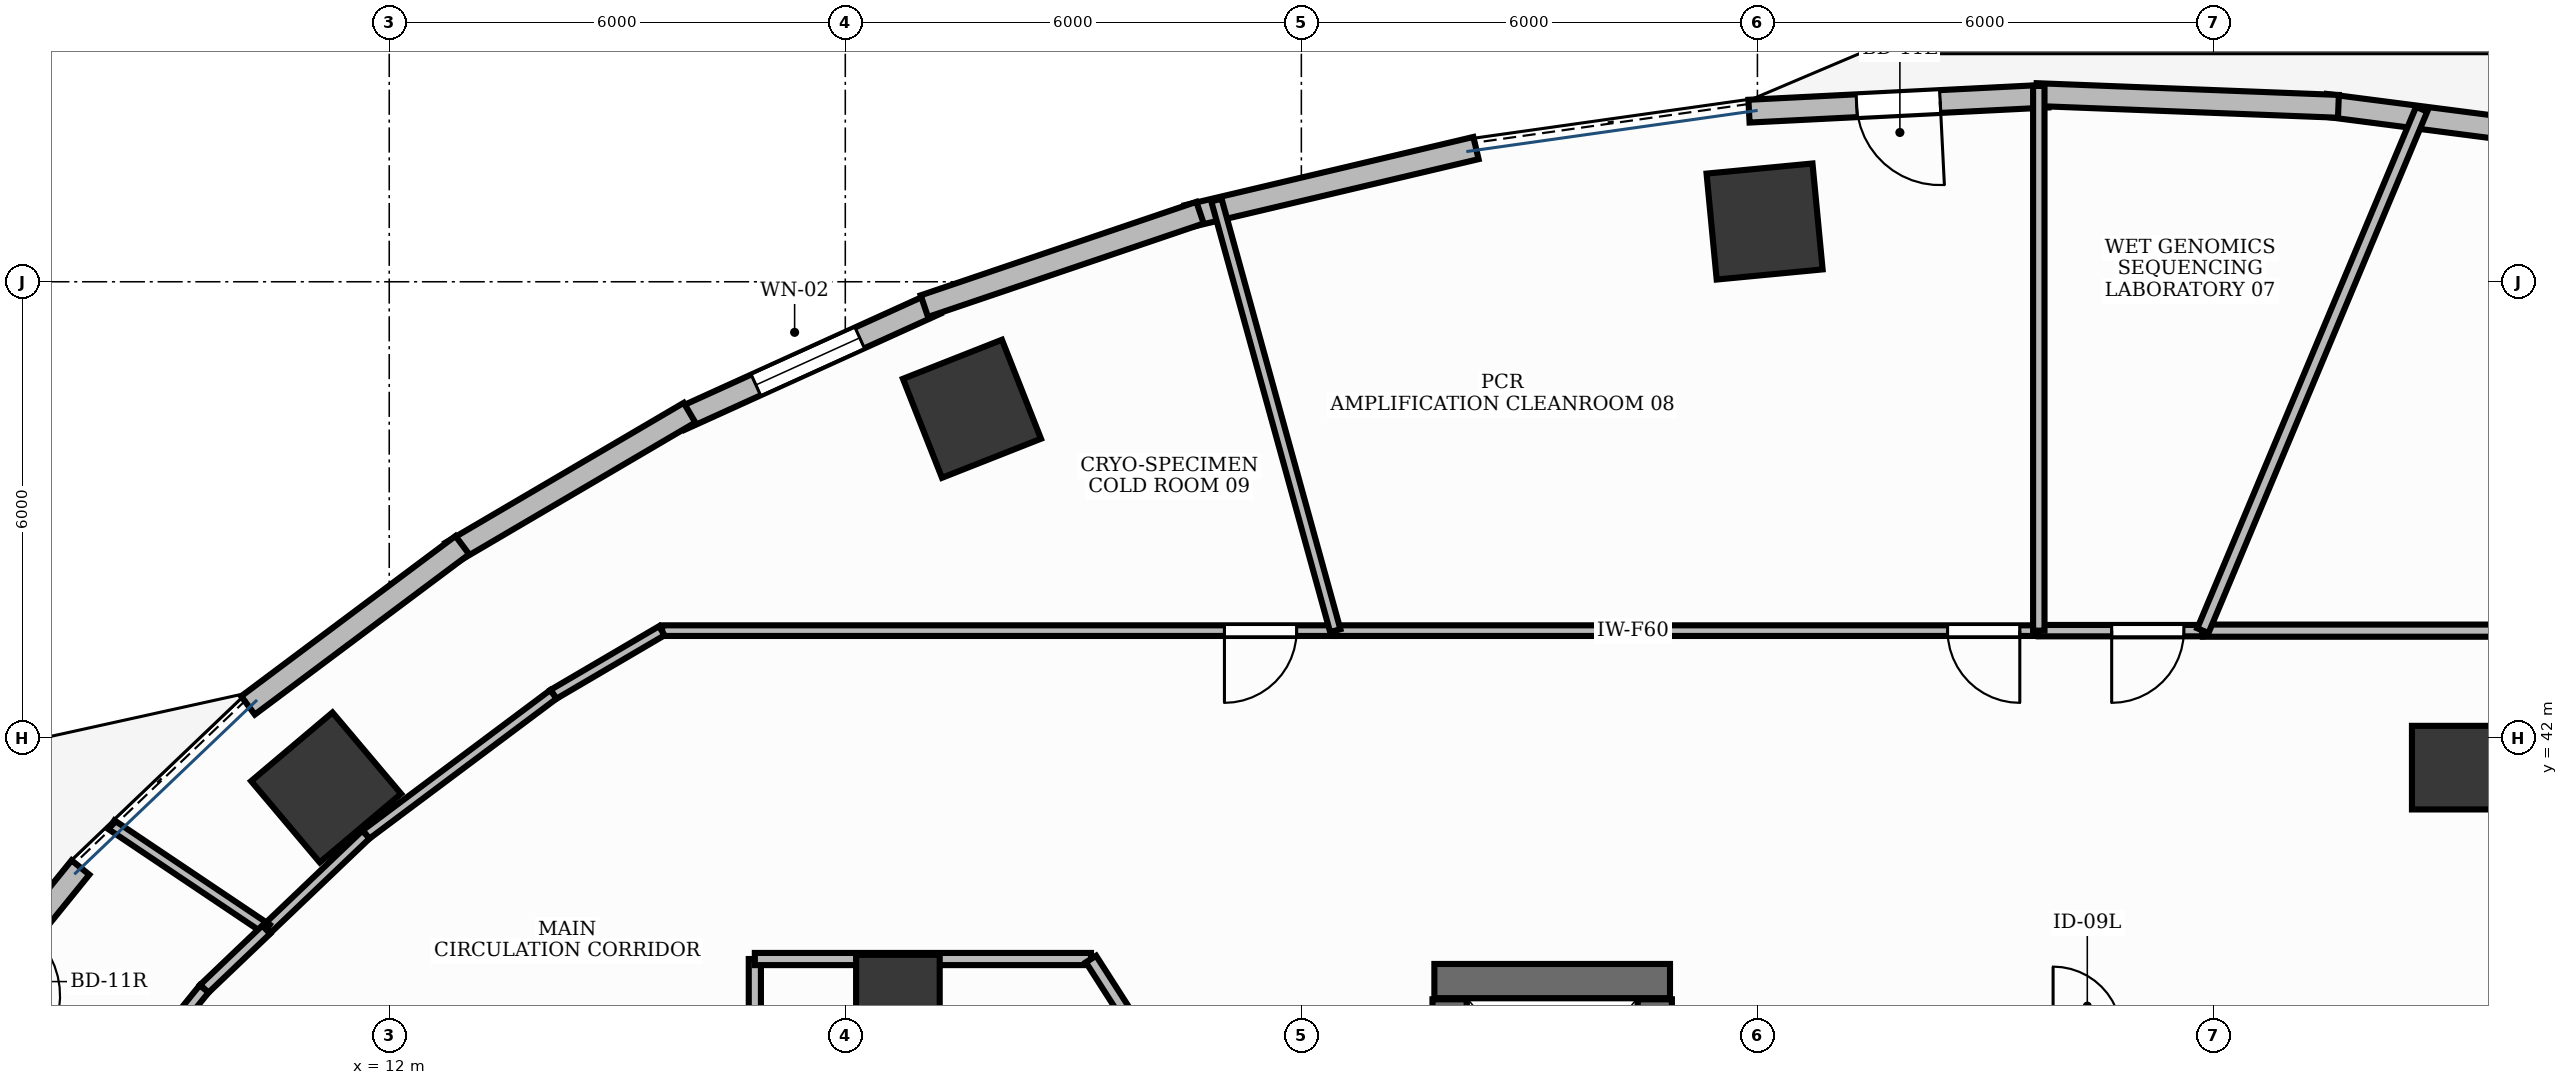
"""IFC4 building model, lengths in metres.
Left out: names, types, materials, properties, quantities, classifications, styles, units other than length and angle.
Written with IfcOpenShell. Run it as: python <this file> out.ifc"""

import sys

from ifc_helpers import new_model, si_unit, direction, frame, frame_2d, origin, origin_2d, place, context, subcontext, project, spatial, rectangle, extrude, element, fill, save


model = new_model("IFC4")
c1 = context("Model", 3, precision=1e-05, world=origin(), true_north=direction((0.0, 1.0)))
c2 = subcontext(c1, "Body", "Model", "MODEL_VIEW")
j1 = project(units=[si_unit("LENGTHUNIT", "METRE"), si_unit("PLANEANGLEUNIT", "RADIAN")], contexts=[c1])
p1 = place(None, origin())
s1 = spatial("IfcSite", under=j1, at=p1, CompositionType="ELEMENT")
p2 = place(p1, origin())
s2 = spatial("IfcBuilding", under=s1, at=p2, CompositionType="ELEMENT")
p3 = place(p2, frame((0.0, 0.0, 80.4)))
s3 = spatial("IfcBuildingStorey", under=s2, at=p3, CompositionType="ELEMENT", Elevation=80.4)
p4 = place(p3, frame((25.75, 38.8, 0.0), z_axis=(0.0, 0.0, 1.0), x_axis=(1.0, 0.0, 0.0)))
e1 = element("IfcWall", 1, at=p4, inside=s3, PredefinedType="SHEAR", context=c2, shape_type="SweptSolid", body=[
    extrude(rectangle(XDim=3.1, YDim=0.45, at=frame_2d((1.55, 0.0))), origin(), (0.0, 0.0, 1.0), 3.88),
])
for number, where, z_axis, x_axis in (
    (2, (25.95, 35.86, 0.0), (0.0, 0.0, 1.0), (0.0, 1.0, 0.0)),
    (3, (28.65, 35.86, 0.0), (0.0, 0.0, 1.0), (0.0, 1.0, 0.0)),
):
    element("IfcWall", number, at=place(p3, frame(where, z_axis=z_axis, x_axis=x_axis)), inside=s3, PredefinedType="SHEAR", context=c2, shape_type="SweptSolid", body=[
        extrude(rectangle(XDim=2.7, YDim=0.45, at=frame_2d((1.35, 0.0))), origin(), (0.0, 0.0, 1.0), 3.88),
    ])
p5 = place(p3, frame((39.161, 41.608, -0.0), z_axis=(0.0, 0.0, 1.0), x_axis=(1.0, 0.0, 0.0)))
e4 = element("IfcColumn", 4, at=p5, inside=s3, PredefinedType="COLUMN", context=c2, shape_type="SweptSolid", body=[
    extrude(rectangle(XDim=1.1, YDim=1.1, at=origin_2d()), origin(), (0.0, 0.0, 1.0), 3.881),
])
for number, where, z_axis, x_axis in (
    (5, (30.094, 48.792, -0.0), (0.0, 0.0, 1.0), (0.995, 0.095, 0.0)),
    (6, (19.667, 46.329, -0.0), (0.0, 0.0, 1.0), (0.93, 0.367, 0.0)),
    (7, (11.17, 41.347, -0.0), (0.0, 0.0, 1.0), (0.764, 0.645, 0.0)),
):
    element("IfcColumn", number, at=place(p3, frame(where, z_axis=z_axis, x_axis=x_axis)), inside=s3, PredefinedType="COLUMN", context=c2, shape_type="SweptSolid", body=[
        extrude(rectangle(XDim=1.4, YDim=1.4, at=origin_2d()), origin(), (0.0, 0.0, 1.0), 3.881),
    ])
p6 = place(p3, frame((18.692, 38.595, -0.0), z_axis=(0.0, 0.0, 1.0), x_axis=(1.0, 0.0, 0.0)))
e8 = element("IfcColumn", 8, at=p6, inside=s3, PredefinedType="COLUMN", context=c2, shape_type="SweptSolid", body=[
    extrude(rectangle(XDim=1.1, YDim=1.1, at=origin_2d()), origin(), (0.0, 0.0, 1.0), 3.881),
])
p7 = place(p3, frame((33.821, 50.442, 0.0), z_axis=(0.0, 0.0, 1.0), x_axis=(-0.99873153138, -0.050352042933, 0.0)))
e9 = element("IfcWall", 9, at=p7, inside=s3, PredefinedType="STANDARD", context=c2, shape_type="SweptSolid", body=[
    extrude(rectangle(XDim=3.937, YDim=0.3, at=frame_2d((1.969, 0.0))), origin(), (0.0, 0.0, 1.0), 3.88),
])
p8 = place(p7, frame((1.419, 0.0, 0.0)))
e10 = element("IfcOpeningElement", 10, at=p8, cuts=e9, PredefinedType="OPENING", context=c2, shape_type="SweptSolid", body=[
    extrude(rectangle(XDim=1.1, YDim=2.15, at=frame_2d((0.55, 1.075))), frame((0.0, 0.165, 0.0), z_axis=(0.0, -1.0, 0.0), x_axis=(1.0, 0.0, 0.0)), (0.0, 0.0, 1.0), 0.33),
])
p9 = place(p3, frame((19.191, 47.717, 0.0), z_axis=(0.0, 0.0, 1.0), x_axis=(-0.910608120407, -0.413270917254, 0.0)))
e11 = element("IfcWall", 11, at=p9, inside=s3, PredefinedType="STANDARD", context=c2, shape_type="SweptSolid", body=[
    extrude(rectangle(XDim=3.7, YDim=0.3, at=frame_2d((1.85, 0.0))), origin(), (0.0, 0.0, 1.0), 3.88),
])
p10 = place(p9, frame((1.1, 0.0, 0.95)))
e12 = element("IfcOpeningElement", 12, at=p10, cuts=e11, PredefinedType="OPENING", context=c2, shape_type="SweptSolid", body=[
    extrude(rectangle(XDim=1.5, YDim=1.8, at=frame_2d((0.75, 0.9))), frame((0.0, 0.165, 0.0), z_axis=(0.0, -1.0, 0.0), x_axis=(1.0, 0.0, 0.0)), (0.0, 0.0, 1.0), 0.33),
])
p11 = place(p3, frame((7.938, 40.294, 0.0), z_axis=(0.0, 0.0, 1.0), x_axis=(-0.629295540187, -0.777166084631, 0.0)))
e13 = element("IfcWall", 13, at=p11, inside=s3, PredefinedType="STANDARD", context=c2, shape_type="SweptSolid", body=[
    extrude(rectangle(XDim=3.248, YDim=0.3, at=frame_2d((1.624, 0.0))), origin(), (0.0, 0.0, 1.0), 3.88),
])
p12 = place(p11, frame((1.074, 0.0, 0.0)))
e14 = element("IfcOpeningElement", 14, at=p12, cuts=e13, PredefinedType="OPENING", context=c2, shape_type="SweptSolid", body=[
    extrude(rectangle(XDim=1.1, YDim=2.15, at=frame_2d((0.55, 1.075))), frame((0.0, 0.165, 0.0), z_axis=(0.0, -1.0, 0.0), x_axis=(1.0, 0.0, 0.0)), (0.0, 0.0, 1.0), 0.33),
])
p13 = place(p3, frame((41.395, 49.815, 0.0), z_axis=(0.0, 0.0, 1.0), x_axis=(-0.991734095036, 0.128310111617, 0.0)))
e15 = element("IfcWall", 15, at=p13, inside=s3, PredefinedType="STANDARD", context=c2, shape_type="SweptSolid", body=[
    extrude(rectangle(XDim=3.956, YDim=0.3, at=frame_2d((1.978, 0.0))), origin(), (0.0, 0.0, 1.0), 3.88),
])
p14 = place(p3, frame((37.644, 50.308, 0.0), z_axis=(0.0, 0.0, 1.0), x_axis=(-0.999245411623, 0.038840794937, 0.0)))
e16 = element("IfcWall", 16, at=p14, inside=s3, PredefinedType="STANDARD", context=c2, shape_type="SweptSolid", body=[
    extrude(rectangle(XDim=3.979, YDim=0.3, at=frame_2d((1.989, 0.0))), origin(), (0.0, 0.0, 1.0), 3.88),
])
p15 = place(p3, frame((26.297, 49.759, 0.0), z_axis=(0.0, 0.0, 1.0), x_axis=(-0.973197600754, -0.229970497863, 0.0)))
e17 = element("IfcWall", 17, at=p15, inside=s3, PredefinedType="STANDARD", context=c2, shape_type="SweptSolid", body=[
    extrude(rectangle(XDim=3.901, YDim=0.3, at=frame_2d((1.951, 0.0))), origin(), (0.0, 0.0, 1.0), 3.88),
])
p16 = place(p3, frame((22.667, 48.909, 0.0), z_axis=(0.0, 0.0, 1.0), x_axis=(-0.94702579403, -0.321157508773, 0.0)))
e18 = element("IfcWall", 18, at=p16, inside=s3, PredefinedType="STANDARD", context=c2, shape_type="SweptSolid", body=[
    extrude(rectangle(XDim=3.83, YDim=0.3, at=frame_2d((1.915, 0.0))), origin(), (0.0, 0.0, 1.0), 3.88),
])
p17 = place(p3, frame((15.951, 46.278, 0.0), z_axis=(0.0, 0.0, 1.0), x_axis=(-0.8624654944, -0.506115867139, 0.0)))
e19 = element("IfcWall", 19, at=p17, inside=s3, PredefinedType="STANDARD", context=c2, shape_type="SweptSolid", body=[
    extrude(rectangle(XDim=3.635, YDim=0.3, at=frame_2d((1.818, 0.0))), origin(), (0.0, 0.0, 1.0), 3.88),
])
p18 = place(p3, frame((12.961, 44.535, 0.0), z_axis=(0.0, 0.0, 1.0), x_axis=(-0.800823020995, -0.598901067827, 0.0)))
e20 = element("IfcWall", 20, at=p18, inside=s3, PredefinedType="STANDARD", context=c2, shape_type="SweptSolid", body=[
    extrude(rectangle(XDim=3.521, YDim=0.3, at=frame_2d((1.76, 0.0))), origin(), (0.0, 0.0, 1.0), 3.88),
])
p19 = place(p3, frame((44.2, 43.41, 0.0), z_axis=(0.0, 0.0, 1.0), x_axis=(-1.0, 0.0, 0.0)))
e21 = element("IfcWall", 21, at=p19, inside=s3, PredefinedType="PARTITIONING", context=c2, shape_type="SweptSolid", body=[
    extrude(rectangle(XDim=8.339, YDim=0.16, at=frame_2d((4.169, 0.0))), origin(), (0.0, 0.0, 1.0), 2.22),
])
p20 = place(p19, frame((1.266, 0.0, 0.0)))
e22 = element("IfcOpeningElement", 22, at=p20, cuts=e21, PredefinedType="OPENING", context=c2, shape_type="SweptSolid", body=[
    extrude(rectangle(XDim=0.95, YDim=2.15, at=frame_2d((0.475, 1.075))), frame((0.0, 0.095, 0.0), z_axis=(0.0, -1.0, 0.0), x_axis=(1.0, 0.0, 0.0)), (0.0, 0.0, 1.0), 0.19),
])
p21 = place(p3, frame((35.851, 43.41, 0.0), z_axis=(0.0, 0.0, 1.0), x_axis=(-1.0, 0.0, 0.0)))
e23 = element("IfcWall", 23, at=p21, inside=s3, PredefinedType="PARTITIONING", context=c2, shape_type="SweptSolid", body=[
    extrude(rectangle(XDim=2.149, YDim=0.15, at=frame_2d((1.074, 0.0))), origin(), (0.0, 0.0, 1.0), 2.22),
])
p22 = place(p21, frame((0.24, 0.0, 0.0)))
e24 = element("IfcOpeningElement", 24, at=p22, cuts=e23, PredefinedType="OPENING", context=c2, shape_type="SweptSolid", body=[
    extrude(rectangle(XDim=0.95, YDim=2.15, at=frame_2d((0.475, 1.075))), frame((0.0, 0.09, 0.0), z_axis=(0.0, -1.0, 0.0), x_axis=(1.0, 0.0, 0.0)), (0.0, 0.0, 1.0), 0.18),
])
p23 = place(p3, frame((33.692, 43.41, 0.0), z_axis=(0.0, 0.0, 1.0), x_axis=(-1.0, 0.0, 0.0)))
e25 = element("IfcWall", 25, at=p23, inside=s3, PredefinedType="PARTITIONING", context=c2, shape_type="SweptSolid", body=[
    extrude(rectangle(XDim=9.246, YDim=0.14, at=frame_2d((4.623, 0.0))), origin(), (0.0, 0.0, 1.0), 2.22),
])
p24 = place(p23, frame((0.24, 0.0, 0.0)))
e26 = element("IfcOpeningElement", 26, at=p24, cuts=e25, PredefinedType="OPENING", context=c2, shape_type="SweptSolid", body=[
    extrude(rectangle(XDim=0.95, YDim=2.15, at=frame_2d((0.475, 1.075))), frame((0.0, 0.085, 0.0), z_axis=(0.0, -1.0, 0.0), x_axis=(1.0, 0.0, 0.0)), (0.0, 0.0, 1.0), 0.17),
])
p25 = place(p3, frame((24.436, 43.41, 0.0), z_axis=(0.0, 0.0, 1.0), x_axis=(-1.0, 0.0, 0.0)))
e27 = element("IfcWall", 27, at=p25, inside=s3, PredefinedType="PARTITIONING", context=c2, shape_type="SweptSolid", body=[
    extrude(rectangle(XDim=8.845, YDim=0.14, at=frame_2d((4.422, 0.0))), origin(), (0.0, 0.0, 1.0), 2.22),
])
p26 = place(p25, frame((0.498, 0.0, 0.0)))
e28 = element("IfcOpeningElement", 28, at=p26, cuts=e27, PredefinedType="OPENING", context=c2, shape_type="SweptSolid", body=[
    extrude(rectangle(XDim=0.95, YDim=2.15, at=frame_2d((0.475, 1.075))), frame((0.0, 0.085, 0.0), z_axis=(0.0, -1.0, 0.0), x_axis=(1.0, 0.0, 0.0)), (0.0, 0.0, 1.0), 0.17),
])
p27 = place(p3, frame((35.861, 43.41, 0.0), z_axis=(0.0, 0.0, 1.0), x_axis=(0.386904937991, 0.922119606645, 0.0)))
e29 = element("IfcWall", 29, at=p27, inside=s3, PredefinedType="PARTITIONING", context=c2, shape_type="SweptSolid", body=[
    extrude(rectangle(XDim=7.439, YDim=0.16, at=frame_2d((3.719, 0.0))), origin(), (0.0, 0.0, 1.0), 2.22),
])
p28 = place(p3, frame((33.702, 43.41, 0.0), z_axis=(0.0, 0.0, 1.0), x_axis=(0.0, 1.0, 0.0)))
e30 = element("IfcWall", 30, at=p28, inside=s3, PredefinedType="PARTITIONING", context=c2, shape_type="SweptSolid", body=[
    extrude(rectangle(XDim=7.167, YDim=0.15, at=frame_2d((3.583, 0.0))), origin(), (0.0, 0.0, 1.0), 2.22),
])
p29 = place(p3, frame((24.446, 43.41, 0.0), z_axis=(0.0, 0.0, 1.0), x_axis=(-0.266051472147, 0.963958823897, 0.0)))
e31 = element("IfcWall", 31, at=p29, inside=s3, PredefinedType="PARTITIONING", context=c2, shape_type="SweptSolid", body=[
    extrude(rectangle(XDim=5.877, YDim=0.14, at=frame_2d((2.938, 0.0))), origin(), (0.0, 0.0, 1.0), 2.22),
])
p30 = place(p3, frame((15.586, 43.409, 0.0), z_axis=(0.0, 0.0, 1.0), x_axis=(-0.862446636904, -0.506148000582, 0.0)))
e32 = element("IfcWall", 32, at=p30, inside=s3, PredefinedType="PARTITIONING", context=c2, shape_type="SweptSolid", body=[
    extrude(rectangle(XDim=1.652, YDim=0.14, at=frame_2d((0.826, 0.0))), origin(), (0.0, 0.0, 1.0), 2.22),
])
p31 = place(p3, frame((14.16, 42.572, 0.0), z_axis=(0.0, 0.0, 1.0), x_axis=(-0.800808090092, -0.598921032227, 0.0)))
e33 = element("IfcWall", 33, at=p31, inside=s3, PredefinedType="PARTITIONING", context=c2, shape_type="SweptSolid", body=[
    extrude(rectangle(XDim=3.079, YDim=0.14, at=frame_2d((1.54, 0.0))), origin(), (0.0, 0.0, 1.0), 2.22),
])
p32 = place(p3, frame((11.693, 40.727, 0.0), z_axis=(0.0, 0.0, 1.0), x_axis=(-0.72364154489, -0.69017600256, 0.0)))
e34 = element("IfcWall", 34, at=p32, inside=s3, PredefinedType="PARTITIONING", context=c2, shape_type="SweptSolid", body=[
    extrude(rectangle(XDim=1.802, YDim=0.14, at=frame_2d((0.901, 0.0))), origin(), (0.0, 0.0, 1.0), 2.22),
])
p33 = place(p3, frame((10.389, 39.483, 0.0), z_axis=(0.0, 0.0, 1.0), x_axis=(-0.8301994927, 0.557466413626, 0.0)))
e35 = element("IfcWall", 35, at=p33, inside=s3, PredefinedType="PARTITIONING", context=c2, shape_type="SweptSolid", body=[
    extrude(rectangle(XDim=2.462, YDim=0.14, at=frame_2d((1.231, 0.0))), origin(), (0.0, 0.0, 1.0), 2.22),
])
p34 = place(p3, frame((16.81, 36.8, 0.0), z_axis=(0.0, 0.0, 1.0), x_axis=(0.0, 1.0, 0.0)))
e36 = element("IfcWall", 36, at=p34, inside=s3, PredefinedType="PARTITIONING", context=c2, shape_type="SweptSolid", body=[
    extrude(rectangle(XDim=2.29, YDim=0.16, at=frame_2d((1.145, 0.0))), origin(), (0.0, 0.0, 1.0), 2.22),
])
p35 = place(p3, frame((16.81, 39.09, 0.0), z_axis=(0.0, 0.0, 1.0), x_axis=(1.0, 0.0, 0.0)))
e37 = element("IfcWall", 37, at=p35, inside=s3, PredefinedType="PARTITIONING", context=c2, shape_type="SweptSolid", body=[
    extrude(rectangle(XDim=4.422, YDim=0.16, at=frame_2d((2.211, 0.0))), origin(), (0.0, 0.0, 1.0), 2.22),
])
p36 = place(p3, frame((21.232, 39.09, 0.0), z_axis=(0.0, 0.0, 1.0), x_axis=(0.539105204185, -0.842238433474, 0.0)))
e38 = element("IfcWall", 38, at=p36, inside=s3, PredefinedType="PARTITIONING", context=c2, shape_type="SweptSolid", body=[
    extrude(rectangle(XDim=0.941, YDim=0.16, at=frame_2d((0.471, 0.0))), origin(), (0.0, 0.0, 1.0), 2.22),
])
p37 = place(p3, frame((10.382, 39.476, 0.0), z_axis=(0.0, 0.0, 1.0), x_axis=(-0.723689756345, -0.690125449872, 0.0)))
e39 = element("IfcWall", 39, at=p37, inside=s3, PredefinedType="PARTITIONING", context=c2, shape_type="SweptSolid", body=[
    extrude(rectangle(XDim=1.127, YDim=0.15, at=frame_2d((0.564, 0.0))), origin(), (0.0, 0.0, 1.0), 2.22),
])
p38 = place(p3, frame((9.565, 38.697, 0.0), z_axis=(0.0, 0.0, 1.0), x_axis=(-0.629270515505, -0.777186347227, 0.0)))
e40 = element("IfcWall", 40, at=p38, inside=s3, PredefinedType="PARTITIONING", context=c2, shape_type="SweptSolid", body=[
    extrude(rectangle(XDim=2.817, YDim=0.15, at=frame_2d((1.409, 0.0))), origin(), (0.0, 0.0, 1.0), 2.22),
])
p39 = place(p8, origin())
e41 = element("IfcDoor", 41, at=p39, inside=s3, OperationType="SINGLE_SWING_LEFT", PredefinedType="DOOR", context=c2, shape_type="SweptSolid", body=[
    extrude(rectangle(XDim=1.1, YDim=2.15, at=frame_2d((0.55, 1.075))), frame((0.0, 0.025, 0.0), z_axis=(0.0, -1.0, 0.0), x_axis=(1.0, 0.0, 0.0)), (0.0, 0.0, 1.0), 0.05),
])
fill(e10, e41)
p40 = place(p10, origin())
e42 = element("IfcWindow", 42, at=p40, inside=s3, PartitioningType="DOUBLE_PANEL_VERTICAL", PredefinedType="WINDOW", context=c2, shape_type="SweptSolid", body=[
    extrude(rectangle(XDim=1.5, YDim=1.8, at=frame_2d((0.75, 0.9))), frame((0.0, 0.03, 0.0), z_axis=(0.0, -1.0, 0.0), x_axis=(1.0, 0.0, 0.0)), (0.0, 0.0, 1.0), 0.06),
])
fill(e12, e42)
p41 = place(p22, origin())
e43 = element("IfcDoor", 43, at=p41, inside=s3, OperationType="SINGLE_SWING_RIGHT", PredefinedType="DOOR", context=c2, shape_type="SweptSolid", body=[
    extrude(rectangle(XDim=0.95, YDim=2.15, at=frame_2d((0.475, 1.075))), frame((0.0, 0.025, 0.0), z_axis=(0.0, -1.0, 0.0), x_axis=(1.0, 0.0, 0.0)), (0.0, 0.0, 1.0), 0.05),
])
fill(e24, e43)
p42 = place(p24, origin())
e44 = element("IfcDoor", 44, at=p42, inside=s3, OperationType="SINGLE_SWING_LEFT", PredefinedType="DOOR", context=c2, shape_type="SweptSolid", body=[
    extrude(rectangle(XDim=0.95, YDim=2.15, at=frame_2d((0.475, 1.075))), frame((0.0, 0.025, 0.0), z_axis=(0.0, -1.0, 0.0), x_axis=(1.0, 0.0, 0.0)), (0.0, 0.0, 1.0), 0.05),
])
fill(e26, e44)
p43 = place(p26, origin())
e45 = element("IfcDoor", 45, at=p43, inside=s3, OperationType="SINGLE_SWING_RIGHT", PredefinedType="DOOR", context=c2, shape_type="SweptSolid", body=[
    extrude(rectangle(XDim=0.95, YDim=2.15, at=frame_2d((0.475, 1.075))), frame((0.0, 0.025, 0.0), z_axis=(0.0, -1.0, 0.0), x_axis=(1.0, 0.0, 0.0)), (0.0, 0.0, 1.0), 0.05),
])
fill(e28, e45)
save(model, sys.argv[1])
